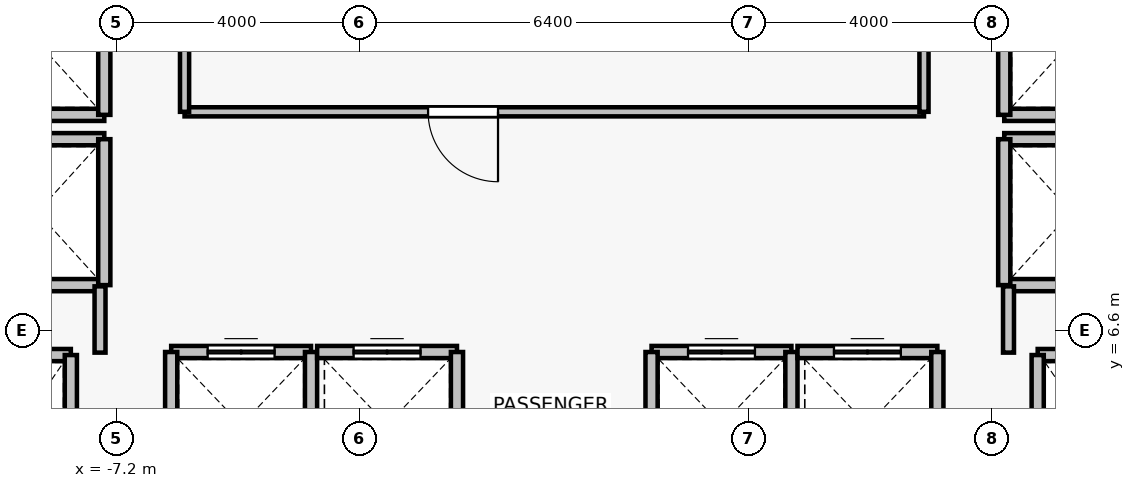
"""IFC4 building model, lengths in metres.
Left out: names, types, materials, properties, quantities, classifications, styles, units other than length and angle.
Written with IfcOpenShell. Run it as: python <this file> out.ifc"""

import sys

from ifc_helpers import new_model, si_unit, direction, frame, frame_2d, origin, place, context, subcontext, project, spatial, rectangle, extrude, source, transform, mapped, element, fill, save


model = new_model("IFC4")
c1 = context("Model", 3, precision=1e-05, world=origin(), true_north=direction((0.0, 1.0)))
c2 = subcontext(c1, "Body", "Model", "MODEL_VIEW")
j1 = project(units=[si_unit("LENGTHUNIT", "METRE"), si_unit("PLANEANGLEUNIT", "RADIAN")], contexts=[c1])
p1 = place(None, origin())
s1 = spatial("IfcSite", under=j1, at=p1, CompositionType="ELEMENT")
p2 = place(p1, origin())
s2 = spatial("IfcBuilding", under=s1, at=p2, CompositionType="ELEMENT")
p3 = place(p2, frame((0.0, 0.0, 90.1)))
s3 = spatial("IfcBuildingStorey", under=s2, at=p3, CompositionType="ELEMENT", Elevation=90.1)
p4 = place(p3, frame((-9.95, 6.2, 0.0), z_axis=(0.0, 0.0, 1.0), x_axis=(1.0, 0.0, 0.0)))
e1 = element("IfcWall", 1, at=p4, inside=s3, PredefinedType="SOLIDWALL", context=c2, shape_type="SweptSolid", body=[
    extrude(rectangle(XDim=2.0, YDim=0.2, at=frame_2d((1.0, 0.0))), origin(), (0.0, 0.0, 1.0), 3.075),
])
p5 = place(p3, frame((-7.95, 6.2, 0.0), z_axis=(0.0, 0.0, 1.0), x_axis=(0.0, -1.0, 0.0)))
e2 = element("IfcWall", 2, at=p5, inside=s3, PredefinedType="SOLIDWALL", context=c2, shape_type="SweptSolid", body=[
    extrude(rectangle(XDim=2.8, YDim=0.2, at=frame_2d((1.4, 0.0))), origin(), (0.0, 0.0, 1.0), 3.075),
])
p6 = place(p3, frame((7.95, 6.2, 0.0), z_axis=(0.0, 0.0, 1.0), x_axis=(1.0, 0.0, 0.0)))
e3 = element("IfcWall", 3, at=p6, inside=s3, PredefinedType="SOLIDWALL", context=c2, shape_type="SweptSolid", body=[
    extrude(rectangle(XDim=2.0, YDim=0.2, at=frame_2d((1.0, 0.0))), origin(), (0.0, 0.0, 1.0), 3.075),
])
p7 = place(p3, frame((7.95, 3.4, 0.0), z_axis=(0.0, 0.0, 1.0), x_axis=(0.0, 1.0, 0.0)))
e4 = element("IfcWall", 4, at=p7, inside=s3, PredefinedType="SOLIDWALL", context=c2, shape_type="SweptSolid", body=[
    extrude(rectangle(XDim=2.8, YDim=0.2, at=frame_2d((1.4, 0.0))), origin(), (0.0, 0.0, 1.0), 3.075),
])
p8 = place(p3, frame((-6.3, 6.25, 0.0), z_axis=(0.0, 0.0, 1.0), x_axis=(1.0, 0.0, 0.0)))
e5 = element("IfcWall", 5, at=p8, inside=s3, PredefinedType="SOLIDWALL", context=c2, shape_type="SweptSolid", body=[
    extrude(rectangle(XDim=2.3, YDim=0.2, at=frame_2d((1.15, 0.0))), origin(), (0.0, 0.0, 1.0), 3.075),
])
p9 = place(p8, frame((0.6, 0.0, 0.0)))
e6 = element("IfcOpeningElement", 6, at=p9, cuts=e5, PredefinedType="OPENING", context=c2, shape_type="SweptSolid", body=[
    extrude(rectangle(XDim=1.1, YDim=2.2, at=frame_2d((0.55, 1.1))), frame((0.0, 0.11, 0.0), z_axis=(0.0, -1.0, 0.0), x_axis=(1.0, 0.0, 0.0)), (0.0, 0.0, 1.0), 0.22),
])
for number, where, z_axis, x_axis in (
    (7, (-6.3, 3.85, 0.0), (0.0, 0.0, 1.0), (0.0, 1.0, 0.0)),
    (8, (-4.0, 6.25, 0.0), (0.0, 0.0, 1.0), (0.0, -1.0, 0.0)),
):
    element("IfcWall", number, at=place(p3, frame(where, z_axis=z_axis, x_axis=x_axis)), inside=s3, PredefinedType="SOLIDWALL", context=c2, shape_type="SweptSolid", body=[
        extrude(rectangle(XDim=2.4, YDim=0.2, at=frame_2d((1.2, 0.0))), origin(), (0.0, 0.0, 1.0), 3.075),
    ])
p10 = place(p3, frame((-3.9, 6.25, 0.0), z_axis=(0.0, 0.0, 1.0), x_axis=(1.0, 0.0, 0.0)))
e9 = element("IfcWall", 9, at=p10, inside=s3, PredefinedType="SOLIDWALL", context=c2, shape_type="SweptSolid", body=[
    extrude(rectangle(XDim=2.3, YDim=0.2, at=frame_2d((1.15, 0.0))), origin(), (0.0, 0.0, 1.0), 3.075),
])
p11 = place(p10, frame((0.6, 0.0, 0.0)))
e10 = element("IfcOpeningElement", 10, at=p11, cuts=e9, PredefinedType="OPENING", context=c2, shape_type="SweptSolid", body=[
    extrude(rectangle(XDim=1.1, YDim=2.2, at=frame_2d((0.55, 1.1))), frame((0.0, 0.11, 0.0), z_axis=(0.0, -1.0, 0.0), x_axis=(1.0, 0.0, 0.0)), (0.0, 0.0, 1.0), 0.22),
])
p12 = place(p3, frame((-1.6, 6.25, 0.0), z_axis=(0.0, 0.0, 1.0), x_axis=(0.0, -1.0, 0.0)))
e11 = element("IfcWall", 11, at=p12, inside=s3, PredefinedType="SOLIDWALL", context=c2, shape_type="SweptSolid", body=[
    extrude(rectangle(XDim=2.4, YDim=0.2, at=frame_2d((1.2, 0.0))), origin(), (0.0, 0.0, 1.0), 3.075),
])
p13 = place(p3, frame((1.6, 6.25, 0.0), z_axis=(0.0, 0.0, 1.0), x_axis=(1.0, 0.0, 0.0)))
e12 = element("IfcWall", 12, at=p13, inside=s3, PredefinedType="SOLIDWALL", context=c2, shape_type="SweptSolid", body=[
    extrude(rectangle(XDim=2.3, YDim=0.2, at=frame_2d((1.15, 0.0))), origin(), (0.0, 0.0, 1.0), 3.075),
])
p14 = place(p13, frame((0.6, 0.0, 0.0)))
e13 = element("IfcOpeningElement", 13, at=p14, cuts=e12, PredefinedType="OPENING", context=c2, shape_type="SweptSolid", body=[
    extrude(rectangle(XDim=1.1, YDim=2.2, at=frame_2d((0.55, 1.1))), frame((0.0, 0.11, 0.0), z_axis=(0.0, -1.0, 0.0), x_axis=(1.0, 0.0, 0.0)), (0.0, 0.0, 1.0), 0.22),
])
for number, where, z_axis, x_axis in (
    (14, (1.6, 3.85, 0.0), (0.0, 0.0, 1.0), (0.0, 1.0, 0.0)),
    (15, (3.9, 6.25, 0.0), (0.0, 0.0, 1.0), (0.0, -1.0, 0.0)),
):
    element("IfcWall", number, at=place(p3, frame(where, z_axis=z_axis, x_axis=x_axis)), inside=s3, PredefinedType="SOLIDWALL", context=c2, shape_type="SweptSolid", body=[
        extrude(rectangle(XDim=2.4, YDim=0.2, at=frame_2d((1.2, 0.0))), origin(), (0.0, 0.0, 1.0), 3.075),
    ])
p15 = place(p3, frame((4.0, 6.25, 0.0), z_axis=(0.0, 0.0, 1.0), x_axis=(1.0, 0.0, 0.0)))
e16 = element("IfcWall", 16, at=p15, inside=s3, PredefinedType="SOLIDWALL", context=c2, shape_type="SweptSolid", body=[
    extrude(rectangle(XDim=2.3, YDim=0.2, at=frame_2d((1.15, 0.0))), origin(), (0.0, 0.0, 1.0), 3.075),
])
p16 = place(p15, frame((0.6, 0.0, 0.0)))
e17 = element("IfcOpeningElement", 17, at=p16, cuts=e16, PredefinedType="OPENING", context=c2, shape_type="SweptSolid", body=[
    extrude(rectangle(XDim=1.1, YDim=2.2, at=frame_2d((0.55, 1.1))), frame((0.0, 0.11, 0.0), z_axis=(0.0, -1.0, 0.0), x_axis=(1.0, 0.0, 0.0)), (0.0, 0.0, 1.0), 0.22),
])
p17 = place(p3, frame((6.3, 6.25, 0.0), z_axis=(0.0, 0.0, 1.0), x_axis=(0.0, -1.0, 0.0)))
e18 = element("IfcWall", 18, at=p17, inside=s3, PredefinedType="SOLIDWALL", context=c2, shape_type="SweptSolid", body=[
    extrude(rectangle(XDim=2.4, YDim=0.2, at=frame_2d((1.2, 0.0))), origin(), (0.0, 0.0, 1.0), 3.075),
])
for number, where, z_axis, x_axis in (
    (19, (-7.4, 7.35, 0.0), (0.0, 0.0, 1.0), (-1.0, 0.0, 0.0)),
    (20, (-9.6, 9.75, 0.0), (0.0, 0.0, 1.0), (1.0, 0.0, 0.0)),
):
    element("IfcWall", number, at=place(p3, frame(where, z_axis=z_axis, x_axis=x_axis)), inside=s3, PredefinedType="SOLIDWALL", context=c2, shape_type="SweptSolid", body=[
        extrude(rectangle(XDim=2.2, YDim=0.2, at=frame_2d((1.1, 0.0))), origin(), (0.0, 0.0, 1.0), 2.515),
    ])
p18 = place(p3, frame((-7.4, 9.75, 0.0), z_axis=(0.0, 0.0, 1.0), x_axis=(0.0, -1.0, 0.0)))
e21 = element("IfcWall", 21, at=p18, inside=s3, PredefinedType="SOLIDWALL", context=c2, shape_type="SweptSolid", body=[
    extrude(rectangle(XDim=2.4, YDim=0.2, at=frame_2d((1.2, 0.0))), origin(), (0.0, 0.0, 1.0), 2.515),
])
p19 = place(p3, frame((-7.4, 10.15, 0.0), z_axis=(0.0, 0.0, 1.0), x_axis=(-1.0, 0.0, 0.0)))
e22 = element("IfcWall", 22, at=p19, inside=s3, PredefinedType="SOLIDWALL", context=c2, shape_type="SweptSolid", body=[
    extrude(rectangle(XDim=2.2, YDim=0.2, at=frame_2d((1.1, 0.0))), origin(), (0.0, 0.0, 1.0), 2.515),
])
p20 = place(p3, frame((-7.4, 12.55, 0.0), z_axis=(0.0, 0.0, 1.0), x_axis=(0.0, -1.0, 0.0)))
e23 = element("IfcWall", 23, at=p20, inside=s3, PredefinedType="SOLIDWALL", context=c2, shape_type="SweptSolid", body=[
    extrude(rectangle(XDim=2.4, YDim=0.2, at=frame_2d((1.2, 0.0))), origin(), (0.0, 0.0, 1.0), 2.515),
])
for number, where, z_axis, x_axis in (
    (24, (9.6, 7.35, 0.0), (0.0, 0.0, 1.0), (-1.0, 0.0, 0.0)),
    (25, (7.4, 9.75, 0.0), (0.0, 0.0, 1.0), (1.0, 0.0, 0.0)),
):
    element("IfcWall", number, at=place(p3, frame(where, z_axis=z_axis, x_axis=x_axis)), inside=s3, PredefinedType="SOLIDWALL", context=c2, shape_type="SweptSolid", body=[
        extrude(rectangle(XDim=2.2, YDim=0.2, at=frame_2d((1.1, 0.0))), origin(), (0.0, 0.0, 1.0), 2.515),
    ])
p21 = place(p3, frame((7.4, 7.35, 0.0), z_axis=(0.0, 0.0, 1.0), x_axis=(0.0, 1.0, 0.0)))
e26 = element("IfcWall", 26, at=p21, inside=s3, PredefinedType="SOLIDWALL", context=c2, shape_type="SweptSolid", body=[
    extrude(rectangle(XDim=2.4, YDim=0.2, at=frame_2d((1.2, 0.0))), origin(), (0.0, 0.0, 1.0), 2.515),
])
p22 = place(p3, frame((9.6, 10.15, 0.0), z_axis=(0.0, 0.0, 1.0), x_axis=(-1.0, 0.0, 0.0)))
e27 = element("IfcWall", 27, at=p22, inside=s3, PredefinedType="SOLIDWALL", context=c2, shape_type="SweptSolid", body=[
    extrude(rectangle(XDim=2.2, YDim=0.2, at=frame_2d((1.1, 0.0))), origin(), (0.0, 0.0, 1.0), 2.515),
])
p23 = place(p3, frame((7.4, 10.15, 0.0), z_axis=(0.0, 0.0, 1.0), x_axis=(0.0, 1.0, 0.0)))
e28 = element("IfcWall", 28, at=p23, inside=s3, PredefinedType="SOLIDWALL", context=c2, shape_type="SweptSolid", body=[
    extrude(rectangle(XDim=2.4, YDim=0.2, at=frame_2d((1.2, 0.0))), origin(), (0.0, 0.0, 1.0), 2.515),
])
for number, where, z_axis, x_axis in (
    (29, (-7.47, 7.33, 0.0), (0.0, 0.0, 1.0), (0.0, -1.0, 0.0)),
    (30, (7.47, 6.24, 0.0), (0.0, 0.0, 1.0), (0.0, 1.0, 0.0)),
):
    element("IfcWall", number, at=place(p3, frame(where, z_axis=z_axis, x_axis=x_axis)), inside=s3, PredefinedType="PARTITIONING", context=c2, shape_type="SweptSolid", body=[
        extrude(rectangle(XDim=1.09, YDim=0.18, at=frame_2d((0.545, 0.0))), origin(), (0.0, 0.0, 1.0), 2.515),
    ])
p24 = place(p3, frame((6.08, 10.2, 0.0), z_axis=(0.0, 0.0, 1.0), x_axis=(-1.0, 0.0, 0.0)))
e31 = element("IfcWall", 31, at=p24, inside=s3, PredefinedType="PARTITIONING", context=c2, shape_type="SweptSolid", body=[
    extrude(rectangle(XDim=12.16, YDim=0.15, at=frame_2d((6.08, 0.0))), origin(), (0.0, 0.0, 1.0), 3.075),
])
p25 = place(p24, frame((7.005, 0.0, 0.0)))
e32 = element("IfcOpeningElement", 32, at=p25, cuts=e31, PredefinedType="OPENING", context=c2, shape_type="SweptSolid", body=[
    extrude(rectangle(XDim=1.15, YDim=2.15, at=frame_2d((0.575, 1.075))), frame((0.0, 0.085, 0.0), z_axis=(0.0, -1.0, 0.0), x_axis=(1.0, 0.0, 0.0)), (0.0, 0.0, 1.0), 0.17),
])
for number, where, z_axis, x_axis in (
    (33, (-6.08, 10.2, 0.0), (0.0, 0.0, 1.0), (0.0, 1.0, 0.0)),
    (34, (6.08, 13.0, 0.0), (0.0, 0.0, 1.0), (0.0, -1.0, 0.0)),
):
    element("IfcWall", number, at=place(p3, frame(where, z_axis=z_axis, x_axis=x_axis)), inside=s3, PredefinedType="PARTITIONING", context=c2, shape_type="SweptSolid", body=[
        extrude(rectangle(XDim=2.8, YDim=0.15, at=frame_2d((1.4, 0.0))), origin(), (0.0, 0.0, 1.0), 3.075),
    ])
m1 = source(origin(), c2, "Body", "SweptSolid", [
    extrude(rectangle(XDim=1.1, YDim=2.2, at=frame_2d((0.55, 1.1))), frame((0.0, 0.025, 0.0), z_axis=(0.0, -1.0, 0.0), x_axis=(1.0, 0.0, 0.0)), (0.0, 0.0, 1.0), 0.05),
])
p26 = place(p9, origin())
e35 = element("IfcDoor", 35, at=p26, inside=s3, OperationType="DOUBLE_DOOR_SLIDING", PredefinedType="DOOR", context=c2, shape_type="MappedRepresentation", body=[
    mapped(m1, transform((0.0, 0.0, 0.0), x_axis=(1.0, 0.0, 0.0), y_axis=(0.0, 1.0, 0.0), z_axis=(0.0, 0.0, 1.0), scale=1.0)),
])
fill(e6, e35)
p27 = place(p11, origin())
e36 = element("IfcDoor", 36, at=p27, inside=s3, OperationType="DOUBLE_DOOR_SLIDING", PredefinedType="DOOR", context=c2, shape_type="MappedRepresentation", body=[
    mapped(m1, transform((0.0, 0.0, 0.0), x_axis=(1.0, 0.0, 0.0), y_axis=(0.0, 1.0, 0.0), z_axis=(0.0, 0.0, 1.0), scale=1.0)),
])
fill(e10, e36)
p28 = place(p14, origin())
e37 = element("IfcDoor", 37, at=p28, inside=s3, OperationType="DOUBLE_DOOR_SLIDING", PredefinedType="DOOR", context=c2, shape_type="MappedRepresentation", body=[
    mapped(m1, transform((0.0, 0.0, 0.0), x_axis=(1.0, 0.0, 0.0), y_axis=(0.0, 1.0, 0.0), z_axis=(0.0, 0.0, 1.0), scale=1.0)),
])
fill(e13, e37)
p29 = place(p16, origin())
e38 = element("IfcDoor", 38, at=p29, inside=s3, OperationType="DOUBLE_DOOR_SLIDING", PredefinedType="DOOR", context=c2, shape_type="MappedRepresentation", body=[
    mapped(m1, transform((0.0, 0.0, 0.0), x_axis=(1.0, 0.0, 0.0), y_axis=(0.0, 1.0, 0.0), z_axis=(0.0, 0.0, 1.0), scale=1.0)),
])
fill(e17, e38)
m2 = source(origin(), c2, "Body", "SweptSolid", [
    extrude(rectangle(XDim=1.15, YDim=2.15, at=frame_2d((0.575, 1.075))), frame((0.0, 0.025, 0.0), z_axis=(0.0, -1.0, 0.0), x_axis=(1.0, 0.0, 0.0)), (0.0, 0.0, 1.0), 0.05),
])
p30 = place(p25, origin())
e39 = element("IfcDoor", 39, at=p30, inside=s3, OperationType="SINGLE_SWING_LEFT", PredefinedType="DOOR", context=c2, shape_type="MappedRepresentation", body=[
    mapped(m2, transform((0.0, 0.0, 0.0), x_axis=(1.0, 0.0, 0.0), y_axis=(0.0, 1.0, 0.0), z_axis=(0.0, 0.0, 1.0), scale=1.0)),
])
fill(e32, e39)
save(model, sys.argv[1])
